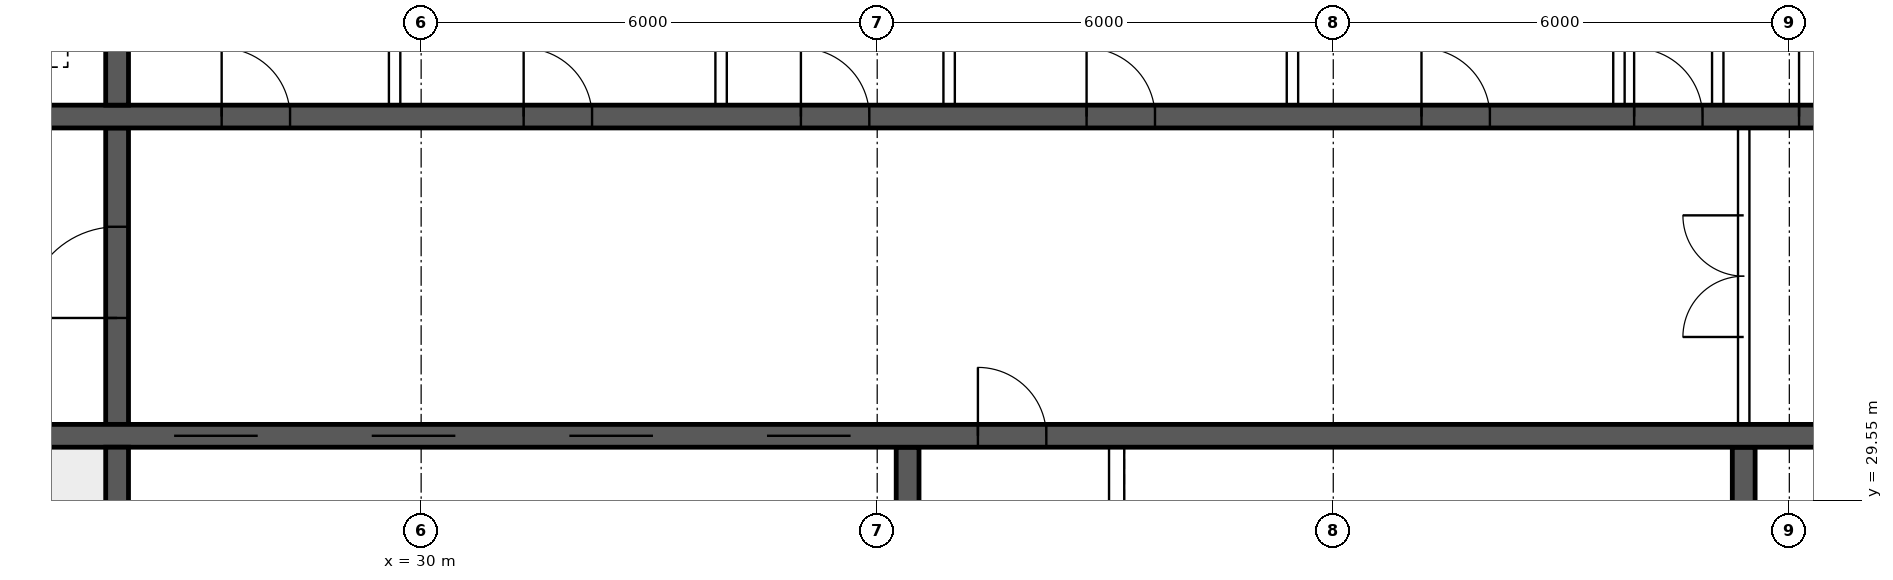
"""IFC4 building model, lengths in metres.
Left out: names, types, materials, properties, quantities, classifications, styles, units other than length and angle.
Written with IfcOpenShell. Run it as: python <this file> out.ifc"""

import sys

from ifc_helpers import new_model, si_unit, direction, frame, frame_2d, origin, place, context, subcontext, project, spatial, rectangle, extrude, element, fill, save


model = new_model("IFC4")
c1 = context("Model", 3, precision=1e-05, world=origin(), true_north=direction((0.0, 1.0)))
c2 = subcontext(c1, "Body", "Model", "MODEL_VIEW")
j1 = project(units=[si_unit("LENGTHUNIT", "METRE"), si_unit("PLANEANGLEUNIT", "RADIAN")], contexts=[c1])
p1 = place(None, origin())
s1 = spatial("IfcSite", under=j1, at=p1, CompositionType="ELEMENT")
p2 = place(p1, origin())
s2 = spatial("IfcBuilding", under=s1, at=p2, CompositionType="ELEMENT")
p3 = place(p2, frame((0.0, 0.0, 99.4)))
s3 = spatial("IfcBuildingStorey", under=s2, at=p3, CompositionType="ELEMENT", Elevation=99.4)
p4 = place(p3, frame((18.475, 30.4, 0.0), z_axis=(0.0, 0.0, 1.0), x_axis=(1.0, 0.0, 0.0)))
e1 = element("IfcWall", 1, at=p4, inside=s3, PredefinedType="SHEAR", context=c2, shape_type="SweptSolid", body=[
    extrude(rectangle(XDim=47.05, YDim=0.3, at=frame_2d((23.525, 0.0))), origin(), (0.0, 0.0, 1.0), 3.75),
])
p5 = place(p4, frame((0.4, 0.0, 0.0)))
e2 = element("IfcOpeningElement", 2, at=p5, cuts=e1, PredefinedType="OPENING", context=c2, shape_type="SweptSolid", body=[
    extrude(rectangle(XDim=1.0, YDim=2.1, at=frame_2d((0.5, 1.05))), frame((0.0, 0.16, 0.0), z_axis=(0.0, -1.0, 0.0), x_axis=(1.0, 0.0, 0.0)), (0.0, 0.0, 1.0), 0.32),
])
p6 = place(p4, frame((45.65, 0.0, 0.0)))
e3 = element("IfcOpeningElement", 3, at=p6, cuts=e1, PredefinedType="OPENING", context=c2, shape_type="SweptSolid", body=[
    extrude(rectangle(XDim=1.0, YDim=2.1, at=frame_2d((0.5, 1.05))), frame((0.0, 0.16, 0.0), z_axis=(0.0, -1.0, 0.0), x_axis=(1.0, 0.0, 0.0)), (0.0, 0.0, 1.0), 0.32),
])
p7 = place(p4, frame((8.275, 0.0, 0.0)))
e4 = element("IfcOpeningElement", 4, at=p7, cuts=e1, PredefinedType="OPENING", context=c2, shape_type="SweptSolid", body=[
    extrude(rectangle(XDim=1.1, YDim=2.1, at=frame_2d((0.55, 1.05))), frame((0.0, 0.16, 0.0), z_axis=(0.0, -1.0, 0.0), x_axis=(1.0, 0.0, 0.0)), (0.0, 0.0, 1.0), 0.32),
])
p8 = place(p4, frame((10.875, 0.0, 0.0)))
e5 = element("IfcOpeningElement", 5, at=p8, cuts=e1, PredefinedType="OPENING", context=c2, shape_type="SweptSolid", body=[
    extrude(rectangle(XDim=1.1, YDim=2.1, at=frame_2d((0.55, 1.05))), frame((0.0, 0.16, 0.0), z_axis=(0.0, -1.0, 0.0), x_axis=(1.0, 0.0, 0.0)), (0.0, 0.0, 1.0), 0.32),
])
p9 = place(p4, frame((13.475, 0.0, 0.0)))
e6 = element("IfcOpeningElement", 6, at=p9, cuts=e1, PredefinedType="OPENING", context=c2, shape_type="SweptSolid", body=[
    extrude(rectangle(XDim=1.1, YDim=2.1, at=frame_2d((0.55, 1.05))), frame((0.0, 0.16, 0.0), z_axis=(0.0, -1.0, 0.0), x_axis=(1.0, 0.0, 0.0)), (0.0, 0.0, 1.0), 0.32),
])
p10 = place(p4, frame((16.075, 0.0, 0.0)))
e7 = element("IfcOpeningElement", 7, at=p10, cuts=e1, PredefinedType="OPENING", context=c2, shape_type="SweptSolid", body=[
    extrude(rectangle(XDim=1.1, YDim=2.1, at=frame_2d((0.55, 1.05))), frame((0.0, 0.16, 0.0), z_axis=(0.0, -1.0, 0.0), x_axis=(1.0, 0.0, 0.0)), (0.0, 0.0, 1.0), 0.32),
])
p11 = place(p4, frame((18.85, 0.0, 0.0)))
e8 = element("IfcOpeningElement", 8, at=p11, cuts=e1, PredefinedType="OPENING", context=c2, shape_type="SweptSolid", body=[
    extrude(rectangle(XDim=0.9, YDim=2.1, at=frame_2d((0.45, 1.05))), frame((0.0, 0.16, 0.0), z_axis=(0.0, -1.0, 0.0), x_axis=(1.0, 0.0, 0.0)), (0.0, 0.0, 1.0), 0.32),
])
p12 = place(p4, frame((30.142, 0.0, 0.0)))
e9 = element("IfcOpeningElement", 9, at=p12, cuts=e1, PredefinedType="OPENING", context=c2, shape_type="SweptSolid", body=[
    extrude(rectangle(XDim=1.1, YDim=2.1, at=frame_2d((0.55, 1.05))), frame((0.0, 0.16, 0.0), z_axis=(0.0, -1.0, 0.0), x_axis=(1.0, 0.0, 0.0)), (0.0, 0.0, 1.0), 0.32),
])
p13 = place(p4, frame((33.675, 0.0, 0.0)))
e10 = element("IfcOpeningElement", 10, at=p13, cuts=e1, PredefinedType="OPENING", context=c2, shape_type="SweptSolid", body=[
    extrude(rectangle(XDim=1.1, YDim=2.1, at=frame_2d((0.55, 1.05))), frame((0.0, 0.16, 0.0), z_axis=(0.0, -1.0, 0.0), x_axis=(1.0, 0.0, 0.0)), (0.0, 0.0, 1.0), 0.32),
])
p14 = place(p4, frame((37.208, 0.0, 0.0)))
e11 = element("IfcOpeningElement", 11, at=p14, cuts=e1, PredefinedType="OPENING", context=c2, shape_type="SweptSolid", body=[
    extrude(rectangle(XDim=1.1, YDim=2.1, at=frame_2d((0.55, 1.05))), frame((0.0, 0.16, 0.0), z_axis=(0.0, -1.0, 0.0), x_axis=(1.0, 0.0, 0.0)), (0.0, 0.0, 1.0), 0.32),
])
p15 = place(p3, frame((18.475, 34.6, 0.0), z_axis=(0.0, 0.0, 1.0), x_axis=(1.0, 0.0, 0.0)))
e12 = element("IfcWall", 12, at=p15, inside=s3, PredefinedType="SHEAR", context=c2, shape_type="SweptSolid", body=[
    extrude(rectangle(XDim=47.05, YDim=0.3, at=frame_2d((23.525, 0.0))), origin(), (0.0, 0.0, 1.0), 3.75),
])
p16 = place(p15, frame((0.9, 0.0, 0.0)))
e13 = element("IfcOpeningElement", 13, at=p16, cuts=e12, PredefinedType="OPENING", context=c2, shape_type="SweptSolid", body=[
    extrude(rectangle(XDim=1.1, YDim=2.1, at=frame_2d((0.55, 1.05))), frame((0.0, 0.16, 0.0), z_axis=(0.0, -1.0, 0.0), x_axis=(1.0, 0.0, 0.0)), (0.0, 0.0, 1.0), 0.32),
])
p17 = place(p15, frame((45.05, 0.0, 0.0)))
e14 = element("IfcOpeningElement", 14, at=p17, cuts=e12, PredefinedType="OPENING", context=c2, shape_type="SweptSolid", body=[
    extrude(rectangle(XDim=1.1, YDim=2.1, at=frame_2d((0.55, 1.05))), frame((0.0, 0.16, 0.0), z_axis=(0.0, -1.0, 0.0), x_axis=(1.0, 0.0, 0.0)), (0.0, 0.0, 1.0), 0.32),
])
p18 = place(p15, frame((4.125, 0.0, 0.0)))
e15 = element("IfcOpeningElement", 15, at=p18, cuts=e12, PredefinedType="OPENING", context=c2, shape_type="SweptSolid", body=[
    extrude(rectangle(XDim=0.9, YDim=2.1, at=frame_2d((0.45, 1.05))), frame((0.0, 0.16, 0.0), z_axis=(0.0, -1.0, 0.0), x_axis=(1.0, 0.0, 0.0)), (0.0, 0.0, 1.0), 0.32),
])
p19 = place(p15, frame((42.025, 0.0, 0.0)))
e16 = element("IfcOpeningElement", 16, at=p19, cuts=e12, PredefinedType="OPENING", context=c2, shape_type="SweptSolid", body=[
    extrude(rectangle(XDim=0.9, YDim=2.1, at=frame_2d((0.45, 1.05))), frame((0.0, 0.16, 0.0), z_axis=(0.0, -1.0, 0.0), x_axis=(1.0, 0.0, 0.0)), (0.0, 0.0, 1.0), 0.32),
])
p20 = place(p15, frame((8.9, 0.0, 0.0)))
e17 = element("IfcOpeningElement", 17, at=p20, cuts=e12, PredefinedType="OPENING", context=c2, shape_type="SweptSolid", body=[
    extrude(rectangle(XDim=0.9, YDim=2.1, at=frame_2d((0.45, 1.05))), frame((0.0, 0.16, 0.0), z_axis=(0.0, -1.0, 0.0), x_axis=(1.0, 0.0, 0.0)), (0.0, 0.0, 1.0), 0.32),
])
p21 = place(p15, frame((12.874, 0.0, 0.0)))
e18 = element("IfcOpeningElement", 18, at=p21, cuts=e12, PredefinedType="OPENING", context=c2, shape_type="SweptSolid", body=[
    extrude(rectangle(XDim=0.9, YDim=2.1, at=frame_2d((0.45, 1.05))), frame((0.0, 0.16, 0.0), z_axis=(0.0, -1.0, 0.0), x_axis=(1.0, 0.0, 0.0)), (0.0, 0.0, 1.0), 0.32),
])
p22 = place(p15, frame((16.521, 0.0, 0.0)))
e19 = element("IfcOpeningElement", 19, at=p22, cuts=e12, PredefinedType="OPENING", context=c2, shape_type="SweptSolid", body=[
    extrude(rectangle(XDim=0.9, YDim=2.1, at=frame_2d((0.45, 1.05))), frame((0.0, 0.16, 0.0), z_axis=(0.0, -1.0, 0.0), x_axis=(1.0, 0.0, 0.0)), (0.0, 0.0, 1.0), 0.32),
])
p23 = place(p15, frame((20.28, 0.0, 0.0)))
e20 = element("IfcOpeningElement", 20, at=p23, cuts=e12, PredefinedType="OPENING", context=c2, shape_type="SweptSolid", body=[
    extrude(rectangle(XDim=0.9, YDim=2.1, at=frame_2d((0.45, 1.05))), frame((0.0, 0.16, 0.0), z_axis=(0.0, -1.0, 0.0), x_axis=(1.0, 0.0, 0.0)), (0.0, 0.0, 1.0), 0.32),
])
p24 = place(p15, frame((24.686, 0.0, 0.0)))
e21 = element("IfcOpeningElement", 21, at=p24, cuts=e12, PredefinedType="OPENING", context=c2, shape_type="SweptSolid", body=[
    extrude(rectangle(XDim=0.9, YDim=2.1, at=frame_2d((0.45, 1.05))), frame((0.0, 0.16, 0.0), z_axis=(0.0, -1.0, 0.0), x_axis=(1.0, 0.0, 0.0)), (0.0, 0.0, 1.0), 0.32),
])
p25 = place(p15, frame((27.483, 0.0, 0.0)))
e22 = element("IfcOpeningElement", 22, at=p25, cuts=e12, PredefinedType="OPENING", context=c2, shape_type="SweptSolid", body=[
    extrude(rectangle(XDim=0.9, YDim=2.1, at=frame_2d((0.45, 1.05))), frame((0.0, 0.16, 0.0), z_axis=(0.0, -1.0, 0.0), x_axis=(1.0, 0.0, 0.0)), (0.0, 0.0, 1.0), 0.32),
])
p26 = place(p15, frame((29.653, 0.0, 0.0)))
e23 = element("IfcOpeningElement", 23, at=p26, cuts=e12, PredefinedType="OPENING", context=c2, shape_type="SweptSolid", body=[
    extrude(rectangle(XDim=0.9, YDim=2.1, at=frame_2d((0.45, 1.05))), frame((0.0, 0.16, 0.0), z_axis=(0.0, -1.0, 0.0), x_axis=(1.0, 0.0, 0.0)), (0.0, 0.0, 1.0), 0.32),
])
p27 = place(p15, frame((33.452, 0.0, 0.0)))
e24 = element("IfcOpeningElement", 24, at=p27, cuts=e12, PredefinedType="OPENING", context=c2, shape_type="SweptSolid", body=[
    extrude(rectangle(XDim=0.9, YDim=2.1, at=frame_2d((0.45, 1.05))), frame((0.0, 0.16, 0.0), z_axis=(0.0, -1.0, 0.0), x_axis=(1.0, 0.0, 0.0)), (0.0, 0.0, 1.0), 0.32),
])
p28 = place(p15, frame((37.403, 0.0, 0.0)))
e25 = element("IfcOpeningElement", 25, at=p28, cuts=e12, PredefinedType="OPENING", context=c2, shape_type="SweptSolid", body=[
    extrude(rectangle(XDim=0.9, YDim=2.1, at=frame_2d((0.45, 1.05))), frame((0.0, 0.16, 0.0), z_axis=(0.0, -1.0, 0.0), x_axis=(1.0, 0.0, 0.0)), (0.0, 0.0, 1.0), 0.32),
])
p29 = place(p3, frame((26.0, 26.275, 0.0), z_axis=(0.0, 0.0, 1.0), x_axis=(0.0, 1.0, 0.0)))
e26 = element("IfcWall", 26, at=p29, inside=s3, PredefinedType="SHEAR", context=c2, shape_type="SweptSolid", body=[
    extrude(rectangle(XDim=3.975, YDim=0.3, at=frame_2d((1.988, 0.0))), origin(), (0.0, 0.0, 1.0), 3.75),
])
p30 = place(p3, frame((26.0, 30.55, 0.0), z_axis=(0.0, 0.0, 1.0), x_axis=(0.0, 1.0, 0.0)))
e27 = element("IfcWall", 27, at=p30, inside=s3, PredefinedType="SHEAR", context=c2, shape_type="SweptSolid", body=[
    extrude(rectangle(XDim=3.9, YDim=0.3, at=frame_2d((1.95, 0.0))), origin(), (0.0, 0.0, 1.0), 3.75),
])
p31 = place(p30, frame((1.4, 0.0, 0.0)))
e28 = element("IfcOpeningElement", 28, at=p31, cuts=e27, PredefinedType="OPENING", context=c2, shape_type="SweptSolid", body=[
    extrude(rectangle(XDim=1.2, YDim=2.1, at=frame_2d((0.6, 1.05))), frame((0.0, 0.16, 0.0), z_axis=(0.0, -1.0, 0.0), x_axis=(1.0, 0.0, 0.0)), (0.0, 0.0, 1.0), 0.32),
])
p32 = place(p3, frame((26.0, 34.75, 0.0), z_axis=(0.0, 0.0, 1.0), x_axis=(0.0, 1.0, 0.0)))
e29 = element("IfcWall", 29, at=p32, inside=s3, PredefinedType="SHEAR", context=c2, shape_type="SweptSolid", body=[
    extrude(rectangle(XDim=2.975, YDim=0.3, at=frame_2d((1.488, 0.0))), origin(), (0.0, 0.0, 1.0), 3.75),
])
for number, where, z_axis, x_axis in (
    (30, (36.4, 26.275, 0.0), (0.0, 0.0, 1.0), (0.0, 1.0, 0.0)),
    (31, (47.4, 26.275, 0.0), (0.0, 0.0, 1.0), (0.0, 1.0, 0.0)),
):
    element("IfcWall", number, at=place(p3, frame(where, z_axis=z_axis, x_axis=x_axis)), inside=s3, PredefinedType="SHEAR", context=c2, shape_type="SweptSolid", body=[
        extrude(rectangle(XDim=3.975, YDim=0.3, at=frame_2d((1.988, 0.0))), origin(), (0.0, 0.0, 1.0), 3.75),
    ])
p33 = place(p3, frame((47.4, 30.55, 0.0), z_axis=(0.0, 0.0, 1.0), x_axis=(0.0, 1.0, 0.0)))
e32 = element("IfcWall", 32, at=p33, inside=s3, PredefinedType="SOLIDWALL", context=c2, shape_type="SweptSolid", body=[
    extrude(rectangle(XDim=3.9, YDim=0.15, at=frame_2d((1.95, 0.0))), origin(), (0.0, 0.0, 1.0), 3.5),
])
p34 = place(p33, frame((1.15, 0.0, 0.0)))
e33 = element("IfcOpeningElement", 33, at=p34, cuts=e32, PredefinedType="OPENING", context=c2, shape_type="SweptSolid", body=[
    extrude(rectangle(XDim=1.6, YDim=2.1, at=frame_2d((0.8, 1.05))), frame((0.0, 0.085, 0.0), z_axis=(0.0, -1.0, 0.0), x_axis=(1.0, 0.0, 0.0)), (0.0, 0.0, 1.0), 0.17),
])
for number, where, z_axis, x_axis in (
    (34, (29.651, 34.75, 0.0), (0.0, 0.0, 1.0), (0.0, 1.0, 0.0)),
    (35, (33.946, 34.75, 0.0), (0.0, 0.0, 1.0), (0.0, 1.0, 0.0)),
    (36, (36.946, 34.75, 0.0), (0.0, 0.0, 1.0), (0.0, 1.0, 0.0)),
    (37, (41.463, 34.75, 0.0), (0.0, 0.0, 1.0), (0.0, 1.0, 0.0)),
    (38, (45.758, 34.75, 0.0), (0.0, 0.0, 1.0), (0.0, 1.0, 0.0)),
    (39, (47.058, 34.75, 0.0), (0.0, 0.0, 1.0), (0.0, 1.0, 0.0)),
):
    element("IfcWall", number, at=place(p3, frame(where, z_axis=z_axis, x_axis=x_axis)), inside=s3, PredefinedType="SOLIDWALL", context=c2, shape_type="SweptSolid", body=[
        extrude(rectangle(XDim=2.975, YDim=0.15, at=frame_2d((1.488, 0.0))), origin(), (0.0, 0.0, 1.0), 3.5),
    ])
p35 = place(p3, frame((39.15, 26.275, 0.0), z_axis=(0.0, 0.0, 1.0), x_axis=(0.0, 1.0, 0.0)))
e40 = element("IfcWall", 40, at=p35, inside=s3, PredefinedType="SOLIDWALL", context=c2, shape_type="SweptSolid", body=[
    extrude(rectangle(XDim=3.975, YDim=0.2, at=frame_2d((1.988, 0.0))), origin(), (0.0, 0.0, 1.0), 3.5),
])
p36 = place(p34, origin())
e41 = element("IfcDoor", 41, at=p36, inside=s3, OperationType="DOUBLE_DOOR_SINGLE_SWING", PredefinedType="DOOR", context=c2, shape_type="SweptSolid", body=[
    extrude(rectangle(XDim=1.6, YDim=2.1, at=frame_2d((0.8, 1.05))), frame((0.0, 0.025, 0.0), z_axis=(0.0, -1.0, 0.0), x_axis=(1.0, 0.0, 0.0)), (0.0, 0.0, 1.0), 0.05),
])
fill(e33, e41)
p37 = place(p31, origin())
e42 = element("IfcDoor", 42, at=p37, inside=s3, OperationType="SINGLE_SWING_LEFT", PredefinedType="DOOR", context=c2, shape_type="SweptSolid", body=[
    extrude(rectangle(XDim=1.2, YDim=2.1, at=frame_2d((0.6, 1.05))), frame((0.0, 0.025, 0.0), z_axis=(0.0, -1.0, 0.0), x_axis=(1.0, 0.0, 0.0)), (0.0, 0.0, 1.0), 0.05),
])
fill(e28, e42)
p38 = place(p20, origin())
e43 = element("IfcDoor", 43, at=p38, inside=s3, OperationType="SINGLE_SWING_LEFT", PredefinedType="DOOR", context=c2, shape_type="SweptSolid", body=[
    extrude(rectangle(XDim=0.9, YDim=2.1, at=frame_2d((0.45, 1.05))), frame((0.0, 0.025, 0.0), z_axis=(0.0, -1.0, 0.0), x_axis=(1.0, 0.0, 0.0)), (0.0, 0.0, 1.0), 0.05),
])
fill(e17, e43)
p39 = place(p21, origin())
e44 = element("IfcDoor", 44, at=p39, inside=s3, OperationType="SINGLE_SWING_LEFT", PredefinedType="DOOR", context=c2, shape_type="SweptSolid", body=[
    extrude(rectangle(XDim=0.9, YDim=2.1, at=frame_2d((0.45, 1.05))), frame((0.0, 0.025, 0.0), z_axis=(0.0, -1.0, 0.0), x_axis=(1.0, 0.0, 0.0)), (0.0, 0.0, 1.0), 0.05),
])
fill(e18, e44)
p40 = place(p22, origin())
e45 = element("IfcDoor", 45, at=p40, inside=s3, OperationType="SINGLE_SWING_LEFT", PredefinedType="DOOR", context=c2, shape_type="SweptSolid", body=[
    extrude(rectangle(XDim=0.9, YDim=2.1, at=frame_2d((0.45, 1.05))), frame((0.0, 0.025, 0.0), z_axis=(0.0, -1.0, 0.0), x_axis=(1.0, 0.0, 0.0)), (0.0, 0.0, 1.0), 0.05),
])
fill(e19, e45)
p41 = place(p23, origin())
e46 = element("IfcDoor", 46, at=p41, inside=s3, OperationType="SINGLE_SWING_LEFT", PredefinedType="DOOR", context=c2, shape_type="SweptSolid", body=[
    extrude(rectangle(XDim=0.9, YDim=2.1, at=frame_2d((0.45, 1.05))), frame((0.0, 0.025, 0.0), z_axis=(0.0, -1.0, 0.0), x_axis=(1.0, 0.0, 0.0)), (0.0, 0.0, 1.0), 0.05),
])
fill(e20, e46)
p42 = place(p24, origin())
e47 = element("IfcDoor", 47, at=p42, inside=s3, OperationType="SINGLE_SWING_LEFT", PredefinedType="DOOR", context=c2, shape_type="SweptSolid", body=[
    extrude(rectangle(XDim=0.9, YDim=2.1, at=frame_2d((0.45, 1.05))), frame((0.0, 0.025, 0.0), z_axis=(0.0, -1.0, 0.0), x_axis=(1.0, 0.0, 0.0)), (0.0, 0.0, 1.0), 0.05),
])
fill(e21, e47)
p43 = place(p25, origin())
e48 = element("IfcDoor", 48, at=p43, inside=s3, OperationType="SINGLE_SWING_LEFT", PredefinedType="DOOR", context=c2, shape_type="SweptSolid", body=[
    extrude(rectangle(XDim=0.9, YDim=2.1, at=frame_2d((0.45, 1.05))), frame((0.0, 0.025, 0.0), z_axis=(0.0, -1.0, 0.0), x_axis=(1.0, 0.0, 0.0)), (0.0, 0.0, 1.0), 0.05),
])
fill(e22, e48)
p44 = place(p26, origin())
e49 = element("IfcDoor", 49, at=p44, inside=s3, OperationType="SINGLE_SWING_LEFT", PredefinedType="DOOR", context=c2, shape_type="SweptSolid", body=[
    extrude(rectangle(XDim=0.9, YDim=2.1, at=frame_2d((0.45, 1.05))), frame((0.0, 0.025, 0.0), z_axis=(0.0, -1.0, 0.0), x_axis=(1.0, 0.0, 0.0)), (0.0, 0.0, 1.0), 0.05),
])
fill(e23, e49)
p45 = place(p7, origin())
e50 = element("IfcDoor", 50, at=p45, inside=s3, OperationType="DOUBLE_DOOR_SLIDING", PredefinedType="DOOR", context=c2, shape_type="SweptSolid", body=[
    extrude(rectangle(XDim=1.1, YDim=2.1, at=frame_2d((0.55, 1.05))), frame((0.0, 0.025, 0.0), z_axis=(0.0, -1.0, 0.0), x_axis=(1.0, 0.0, 0.0)), (0.0, 0.0, 1.0), 0.05),
])
fill(e4, e50)
p46 = place(p8, origin())
e51 = element("IfcDoor", 51, at=p46, inside=s3, OperationType="DOUBLE_DOOR_SLIDING", PredefinedType="DOOR", context=c2, shape_type="SweptSolid", body=[
    extrude(rectangle(XDim=1.1, YDim=2.1, at=frame_2d((0.55, 1.05))), frame((0.0, 0.025, 0.0), z_axis=(0.0, -1.0, 0.0), x_axis=(1.0, 0.0, 0.0)), (0.0, 0.0, 1.0), 0.05),
])
fill(e5, e51)
p47 = place(p9, origin())
e52 = element("IfcDoor", 52, at=p47, inside=s3, OperationType="DOUBLE_DOOR_SLIDING", PredefinedType="DOOR", context=c2, shape_type="SweptSolid", body=[
    extrude(rectangle(XDim=1.1, YDim=2.1, at=frame_2d((0.55, 1.05))), frame((0.0, 0.025, 0.0), z_axis=(0.0, -1.0, 0.0), x_axis=(1.0, 0.0, 0.0)), (0.0, 0.0, 1.0), 0.05),
])
fill(e6, e52)
p48 = place(p10, origin())
e53 = element("IfcDoor", 53, at=p48, inside=s3, OperationType="DOUBLE_DOOR_SLIDING", PredefinedType="DOOR", context=c2, shape_type="SweptSolid", body=[
    extrude(rectangle(XDim=1.1, YDim=2.1, at=frame_2d((0.55, 1.05))), frame((0.0, 0.025, 0.0), z_axis=(0.0, -1.0, 0.0), x_axis=(1.0, 0.0, 0.0)), (0.0, 0.0, 1.0), 0.05),
])
fill(e7, e53)
p49 = place(p11, origin())
e54 = element("IfcDoor", 54, at=p49, inside=s3, OperationType="SINGLE_SWING_LEFT", PredefinedType="DOOR", context=c2, shape_type="SweptSolid", body=[
    extrude(rectangle(XDim=0.9, YDim=2.1, at=frame_2d((0.45, 1.05))), frame((0.0, 0.025, 0.0), z_axis=(0.0, -1.0, 0.0), x_axis=(1.0, 0.0, 0.0)), (0.0, 0.0, 1.0), 0.05),
])
fill(e8, e54)
save(model, sys.argv[1])
